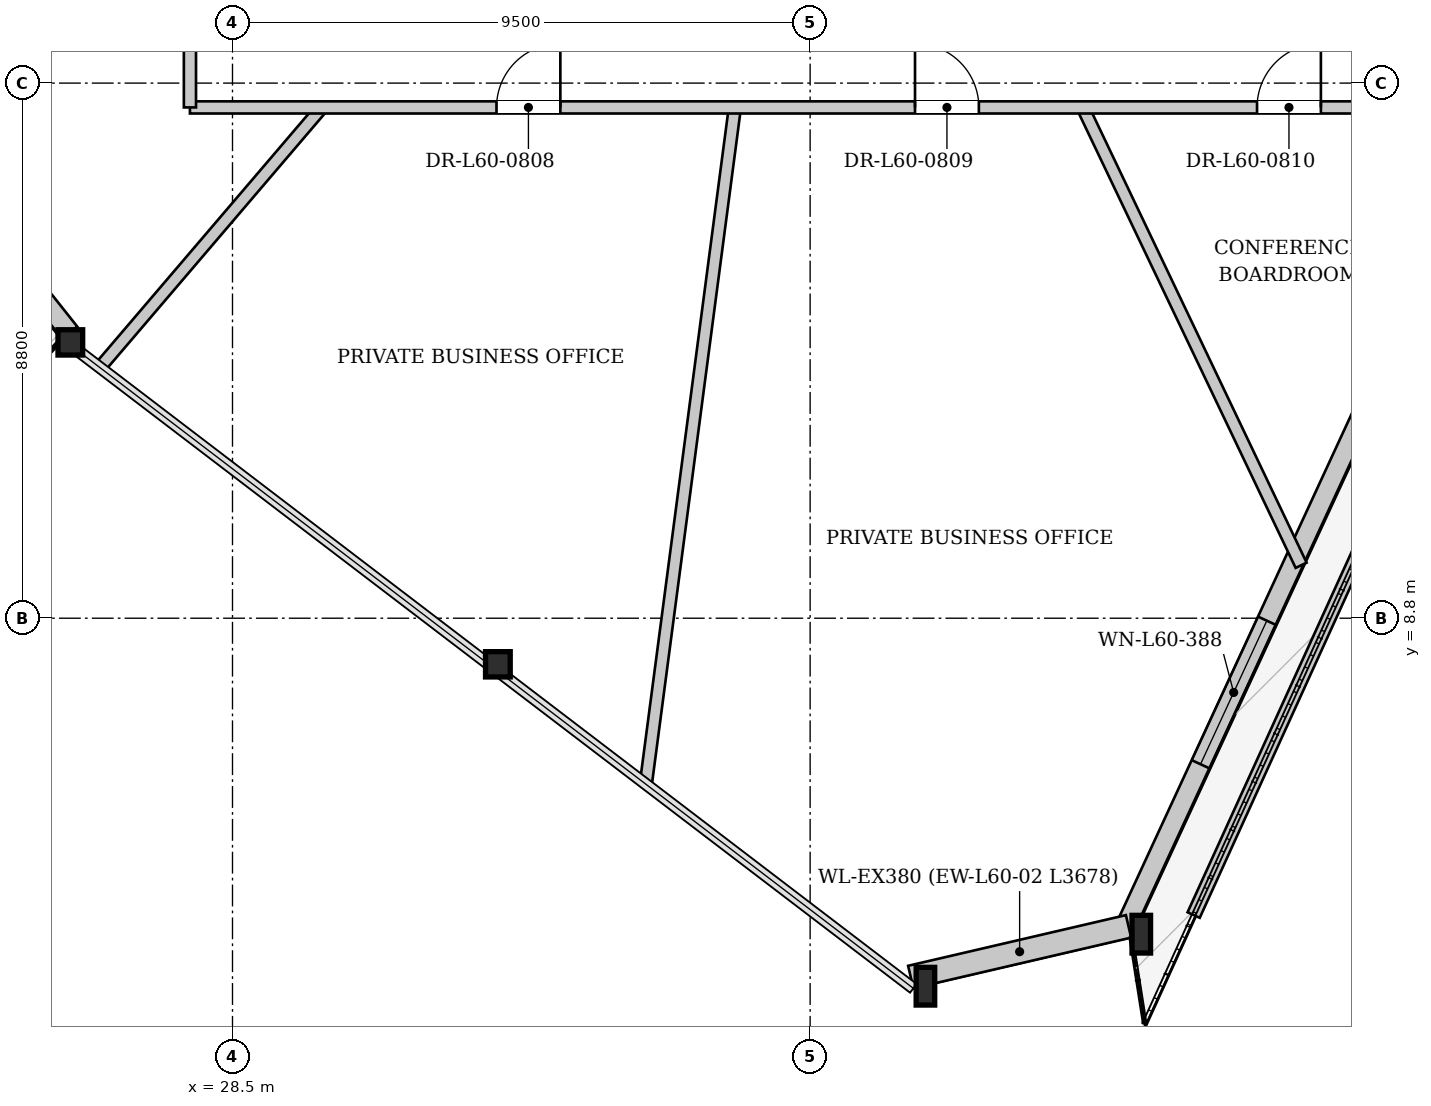
"""IFC4 building model, lengths in metres.
Left out: names, types, materials, properties, quantities, classifications, styles, units other than length and angle.
Written with IfcOpenShell. Run it as: python <this file> out.ifc"""

import sys

from ifc_helpers import new_model, si_unit, direction, frame, frame_2d, origin, origin_2d, place, context, subcontext, project, spatial, rectangle, i_section, extrude, source, transform, mapped, element, fill, save


model = new_model("IFC4")
c1 = context("Model", 3, precision=1e-05, world=origin(), true_north=direction((0.0, 1.0)))
c2 = subcontext(c1, "Body", "Model", "MODEL_VIEW")
j1 = project(units=[si_unit("LENGTHUNIT", "METRE"), si_unit("PLANEANGLEUNIT", "RADIAN")], contexts=[c1])
p1 = place(None, origin())
s1 = spatial("IfcSite", under=j1, at=p1, CompositionType="ELEMENT")
p2 = place(p1, origin())
s2 = spatial("IfcBuilding", under=s1, at=p2, CompositionType="ELEMENT")
p3 = place(p2, frame((0.0, 0.0, 227.35)))
s3 = spatial("IfcBuildingStorey", under=s2, at=p3, CompositionType="ELEMENT", Elevation=227.35)
m1 = source(origin(), c2, "Body", "SweptSolid", [
    extrude(i_section(OverallWidth=0.406, OverallDepth=0.416, WebThickness=0.027, FlangeThickness=0.042, at=origin_2d()), origin(), (0.0, 0.0, 1.0), 3.398),
])
p4 = place(p3, frame((25.697, 13.397, 0.0), z_axis=(0.080321740107, -0.03599391037, 0.99611889676), x_axis=(0.40893871704, 0.912561847606, 0.0)))
e1 = element("IfcColumn", 1, at=p4, inside=s3, PredefinedType="COLUMN", context=c2, shape_type="MappedRepresentation", body=[
    mapped(m1, transform((0.0, 0.0, 0.0), x_axis=(1.0, 0.0, 0.0), y_axis=(0.0, 1.0, 0.0), z_axis=(0.0, 0.0, 1.0), scale=1.0)),
])
m2 = source(origin(), c2, "Body", "SweptSolid", [
    extrude(i_section(OverallWidth=0.406, OverallDepth=0.416, WebThickness=0.027, FlangeThickness=0.042, at=origin_2d()), origin(), (0.0, 0.0, 1.0), 3.402),
])
p5 = place(p3, frame((32.697, 8.055, 0.0), z_axis=(0.09847024056, -0.007823073047, 0.995109245888), x_axis=(0.079196525822, 0.996859022278, 0.0)))
e2 = element("IfcColumn", 2, at=p5, inside=s3, PredefinedType="COLUMN", context=c2, shape_type="MappedRepresentation", body=[
    mapped(m2, transform((0.0, 0.0, 0.0), x_axis=(1.0, 0.0, 0.0), y_axis=(0.0, 1.0, 0.0), z_axis=(0.0, 0.0, 1.0), scale=1.0)),
])
m3 = source(origin(), c2, "Body", "SweptSolid", [
    extrude(i_section(OverallWidth=0.305, OverallDepth=0.62, WebThickness=0.021, FlangeThickness=0.04, at=origin_2d()), origin(), (0.0, 0.0, 1.0), 3.409),
])
p6 = place(p3, frame((39.698, 2.714, 0.0), z_axis=(0.116451399561, 0.020339604843, 0.992988102655), x_axis=(-0.172057014758, 0.985086992947, 0.0)))
e3 = element("IfcColumn", 3, at=p6, inside=s3, PredefinedType="COLUMN", context=c2, shape_type="MappedRepresentation", body=[
    mapped(m3, transform((0.0, 0.0, 0.0), x_axis=(1.0, 0.0, 0.0), y_axis=(0.0, 1.0, 0.0), z_axis=(0.0, 0.0, 1.0), scale=1.0)),
])
m4 = source(origin(), c2, "Body", "SweptSolid", [
    extrude(i_section(OverallWidth=0.305, OverallDepth=0.62, WebThickness=0.021, FlangeThickness=0.04, at=origin_2d()), origin(), (0.0, 0.0, 1.0), 3.403),
])
p7 = place(p3, frame((43.28, 3.547, 0.0), z_axis=(0.098063478416, 0.033285628372, 0.994623356424), x_axis=(-0.321418363983, 0.946937292166, 0.0)))
e4 = element("IfcColumn", 4, at=p7, inside=s3, PredefinedType="COLUMN", context=c2, shape_type="MappedRepresentation", body=[
    mapped(m4, transform((0.0, 0.0, 0.0), x_axis=(1.0, 0.0, 0.0), y_axis=(0.0, 1.0, 0.0), z_axis=(0.0, 0.0, 1.0), scale=1.0)),
])
p8 = place(p3, frame((52.76, 24.451, 0.0), z_axis=(0.0, 0.0, 1.0), x_axis=(-0.419378553641, -0.907811449997, 0.0)))
e5 = element("IfcWall", 5, at=p8, inside=s3, PredefinedType="SOLIDWALL", context=c2, shape_type="SweptSolid", body=[
    extrude(rectangle(XDim=22.952, YDim=0.32, at=frame_2d((11.476, 0.0))), origin(), (0.0, 0.0, 1.0), 2.822),
])
p9 = place(p8, frame((6.795, 0.0, 0.0)))
e6 = element("IfcOpeningElement", 6, at=p9, cuts=e5, PredefinedType="OPENING", context=c2, shape_type="SweptSolid", body=[
    extrude(rectangle(XDim=1.5, YDim=2.3, at=frame_2d((0.75, 1.15))), frame((0.0, 0.17, 0.0), z_axis=(0.0, -1.0, 0.0), x_axis=(1.0, 0.0, 0.0)), (0.0, 0.0, 1.0), 0.34),
])
p10 = place(p8, frame((17.285, 0.0, 0.352)))
e7 = element("IfcOpeningElement", 7, at=p10, cuts=e5, PredefinedType="OPENING", context=c2, shape_type="SweptSolid", body=[
    extrude(rectangle(XDim=2.6, YDim=2.35, at=frame_2d((1.3, 1.175))), frame((0.0, 0.17, 0.0), z_axis=(0.0, -1.0, 0.0), x_axis=(1.0, 0.0, 0.0)), (0.0, 0.0, 1.0), 0.34),
])
p11 = place(p3, frame((43.236, 3.732, 0.0), z_axis=(0.0, 0.0, 1.0), x_axis=(-0.973962023235, -0.22671122005, 0.0)))
e8 = element("IfcWall", 8, at=p11, inside=s3, PredefinedType="SOLIDWALL", context=c2, shape_type="SweptSolid", body=[
    extrude(rectangle(XDim=3.677, YDim=0.38, at=frame_2d((1.839, 0.0))), origin(), (0.0, 0.0, 1.0), 2.822),
])
p12 = place(p3, frame((25.822, 13.497, 0.0), z_axis=(0.0, 0.0, 1.0), x_axis=(-0.621793124768, 0.783181530675, 0.0)))
e9 = element("IfcWall", 9, at=p12, inside=s3, PredefinedType="SOLIDWALL", context=c2, shape_type="SweptSolid", body=[
    extrude(rectangle(XDim=17.612, YDim=0.32, at=frame_2d((8.806, 0.0))), origin(), (0.0, 0.0, 1.0), 2.822),
])
p13 = place(p12, frame((4.886, 0.0, 0.0)))
e10 = element("IfcOpeningElement", 10, at=p13, cuts=e9, PredefinedType="OPENING", context=c2, shape_type="SweptSolid", body=[
    extrude(rectangle(XDim=1.5, YDim=2.3, at=frame_2d((0.75, 1.15))), frame((0.0, 0.17, 0.0), z_axis=(0.0, -1.0, 0.0), x_axis=(1.0, 0.0, 0.0)), (0.0, 0.0, 1.0), 0.34),
])
p14 = place(p12, frame((11.733, 0.0, 0.352)))
e11 = element("IfcOpeningElement", 11, at=p14, cuts=e9, PredefinedType="OPENING", context=c2, shape_type="SweptSolid", body=[
    extrude(rectangle(XDim=2.6, YDim=2.35, at=frame_2d((1.3, 1.175))), frame((0.0, 0.17, 0.0), z_axis=(0.0, -1.0, 0.0), x_axis=(1.0, 0.0, 0.0)), (0.0, 0.0, 1.0), 0.34),
])
p15 = place(p3, frame((44.308, 3.919, 0.0), z_axis=(0.0, 0.0, 1.0), x_axis=(0.41441444949, 0.910088272671, 0.0)))
e12 = element("IfcWall", 12, at=p15, inside=s3, PredefinedType="PARAPET", context=c2, shape_type="SweptSolid", body=[
    extrude(rectangle(XDim=20.451, YDim=0.22, at=frame_2d((10.226, 0.0))), origin(), (0.0, 0.0, 1.0), 0.3),
])
p16 = place(p3, frame((29.972, 17.2, 0.0), z_axis=(0.0, 0.0, 1.0), x_axis=(-0.649446430955, -0.760407346966, 0.0)))
e13 = element("IfcWall", 13, at=p16, inside=s3, PredefinedType="PARTITIONING", context=c2, shape_type="SweptSolid", body=[
    extrude(rectangle(XDim=5.595, YDim=0.2, at=frame_2d((2.798, 0.0))), origin(), (0.0, 0.0, 1.0), 3.33),
])
p17 = place(p3, frame((36.762, 17.2, 0.0), z_axis=(0.0, 0.0, 1.0), x_axis=(-0.130511513765, -0.991446793719, 0.0)))
e14 = element("IfcWall", 14, at=p17, inside=s3, PredefinedType="PARTITIONING", context=c2, shape_type="SweptSolid", body=[
    extrude(rectangle(XDim=11.19, YDim=0.2, at=frame_2d((5.595, 0.0))), origin(), (0.0, 0.0, 1.0), 3.33),
])
p18 = place(p3, frame((42.484, 17.2, 0.0), z_axis=(0.0, 0.0, 1.0), x_axis=(0.430513972501, -0.902583912709, 0.0)))
e15 = element("IfcWall", 15, at=p18, inside=s3, PredefinedType="PARTITIONING", context=c2, shape_type="SweptSolid", body=[
    extrude(rectangle(XDim=8.343, YDim=0.2, at=frame_2d((4.171, 0.0))), origin(), (0.0, 0.0, 1.0), 3.33),
])
p19 = place(p3, frame((27.8, 17.2, 0.0), z_axis=(0.0, 0.0, 1.0), x_axis=(1.0, 0.0, 0.0)))
e16 = element("IfcWall", 16, at=p19, inside=s3, PredefinedType="PARTITIONING", context=c2, shape_type="SweptSolid", body=[
    extrude(rectangle(XDim=20.4, YDim=0.2, at=frame_2d((10.2, 0.0))), origin(), (0.0, 0.0, 1.0), 3.33),
])
p20 = place(p19, frame((5.042, 0.0, 0.0)))
e17 = element("IfcOpeningElement", 17, at=p20, cuts=e16, PredefinedType="OPENING", context=c2, shape_type="SweptSolid", body=[
    extrude(rectangle(XDim=1.05, YDim=2.2, at=frame_2d((0.525, 1.1))), frame((0.0, 0.11, 0.0), z_axis=(0.0, -1.0, 0.0), x_axis=(1.0, 0.0, 0.0)), (0.0, 0.0, 1.0), 0.22),
])
p21 = place(p19, frame((11.925, 0.0, 0.0)))
e18 = element("IfcOpeningElement", 18, at=p21, cuts=e16, PredefinedType="OPENING", context=c2, shape_type="SweptSolid", body=[
    extrude(rectangle(XDim=1.05, YDim=2.2, at=frame_2d((0.525, 1.1))), frame((0.0, 0.11, 0.0), z_axis=(0.0, -1.0, 0.0), x_axis=(1.0, 0.0, 0.0)), (0.0, 0.0, 1.0), 0.22),
])
p22 = place(p19, frame((17.55, 0.0, 0.0)))
e19 = element("IfcOpeningElement", 19, at=p22, cuts=e16, PredefinedType="OPENING", context=c2, shape_type="SweptSolid", body=[
    extrude(rectangle(XDim=1.05, YDim=2.2, at=frame_2d((0.525, 1.1))), frame((0.0, 0.11, 0.0), z_axis=(0.0, -1.0, 0.0), x_axis=(1.0, 0.0, 0.0)), (0.0, 0.0, 1.0), 0.22),
])
p23 = place(p3, frame((27.8, 17.2, 0.0), z_axis=(0.0, 0.0, 1.0), x_axis=(0.0, 1.0, 0.0)))
e20 = element("IfcWall", 20, at=p23, inside=s3, PredefinedType="PARTITIONING", context=c2, shape_type="SweptSolid", body=[
    extrude(rectangle(XDim=18.8, YDim=0.2, at=frame_2d((9.4, 0.0))), origin(), (0.0, 0.0, 1.0), 3.33),
])
p24 = place(p23, frame((16.438, 0.0, 0.0)))
e21 = element("IfcOpeningElement", 21, at=p24, cuts=e20, PredefinedType="OPENING", context=c2, shape_type="SweptSolid", body=[
    extrude(rectangle(XDim=1.05, YDim=2.2, at=frame_2d((0.525, 1.1))), frame((0.0, 0.11, 0.0), z_axis=(0.0, -1.0, 0.0), x_axis=(1.0, 0.0, 0.0)), (0.0, 0.0, 1.0), 0.22),
])
p25 = place(p23, frame((7.689, 0.0, 0.0)))
e22 = element("IfcOpeningElement", 22, at=p25, cuts=e20, PredefinedType="OPENING", context=c2, shape_type="SweptSolid", body=[
    extrude(rectangle(XDim=1.05, YDim=2.2, at=frame_2d((0.525, 1.1))), frame((0.0, 0.11, 0.0), z_axis=(0.0, -1.0, 0.0), x_axis=(1.0, 0.0, 0.0)), (0.0, 0.0, 1.0), 0.22),
])
p26 = place(p23, frame((1.495, 0.0, 0.0)))
e23 = element("IfcOpeningElement", 23, at=p26, cuts=e20, PredefinedType="OPENING", context=c2, shape_type="SweptSolid", body=[
    extrude(rectangle(XDim=1.05, YDim=2.2, at=frame_2d((0.525, 1.1))), frame((0.0, 0.11, 0.0), z_axis=(0.0, -1.0, 0.0), x_axis=(1.0, 0.0, 0.0)), (0.0, 0.0, 1.0), 0.22),
])
m5 = source(origin(), c2, "Body", "SweptSolid", [
    extrude(rectangle(XDim=2.6, YDim=2.35, at=frame_2d((1.3, 1.175))), frame((0.0, 0.03, 0.0), z_axis=(0.0, -1.0, 0.0), x_axis=(1.0, 0.0, 0.0)), (0.0, 0.0, 1.0), 0.06),
])
p27 = place(p10, origin())
e24 = element("IfcWindow", 24, at=p27, inside=s3, PartitioningType="SINGLE_PANEL", PredefinedType="WINDOW", context=c2, shape_type="MappedRepresentation", body=[
    mapped(m5, transform((0.0, 0.0, 0.0), x_axis=(1.0, 0.0, 0.0), y_axis=(0.0, 1.0, 0.0), z_axis=(0.0, 0.0, 1.0), scale=1.0)),
])
fill(e7, e24)
m6 = source(origin(), c2, "Body", "SweptSolid", [
    extrude(rectangle(XDim=1.05, YDim=2.2, at=frame_2d((0.525, 1.1))), frame((0.0, 0.025, 0.0), z_axis=(0.0, -1.0, 0.0), x_axis=(1.0, 0.0, 0.0)), (0.0, 0.0, 1.0), 0.05),
])
p28 = place(p20, origin())
e25 = element("IfcDoor", 25, at=p28, inside=s3, OperationType="SINGLE_SWING_RIGHT", PredefinedType="DOOR", context=c2, shape_type="MappedRepresentation", body=[
    mapped(m6, transform((0.0, 0.0, 0.0), x_axis=(1.0, 0.0, 0.0), y_axis=(0.0, 1.0, 0.0), z_axis=(0.0, 0.0, 1.0), scale=1.0)),
])
fill(e17, e25)
p29 = place(p21, origin())
e26 = element("IfcDoor", 26, at=p29, inside=s3, OperationType="SINGLE_SWING_LEFT", PredefinedType="DOOR", context=c2, shape_type="MappedRepresentation", body=[
    mapped(m6, transform((0.0, 0.0, 0.0), x_axis=(1.0, 0.0, 0.0), y_axis=(0.0, 1.0, 0.0), z_axis=(0.0, 0.0, 1.0), scale=1.0)),
])
fill(e18, e26)
p30 = place(p22, origin())
e27 = element("IfcDoor", 27, at=p30, inside=s3, OperationType="SINGLE_SWING_RIGHT", PredefinedType="DOOR", context=c2, shape_type="MappedRepresentation", body=[
    mapped(m6, transform((0.0, 0.0, 0.0), x_axis=(1.0, 0.0, 0.0), y_axis=(0.0, 1.0, 0.0), z_axis=(0.0, 0.0, 1.0), scale=1.0)),
])
fill(e19, e27)
save(model, sys.argv[1])
